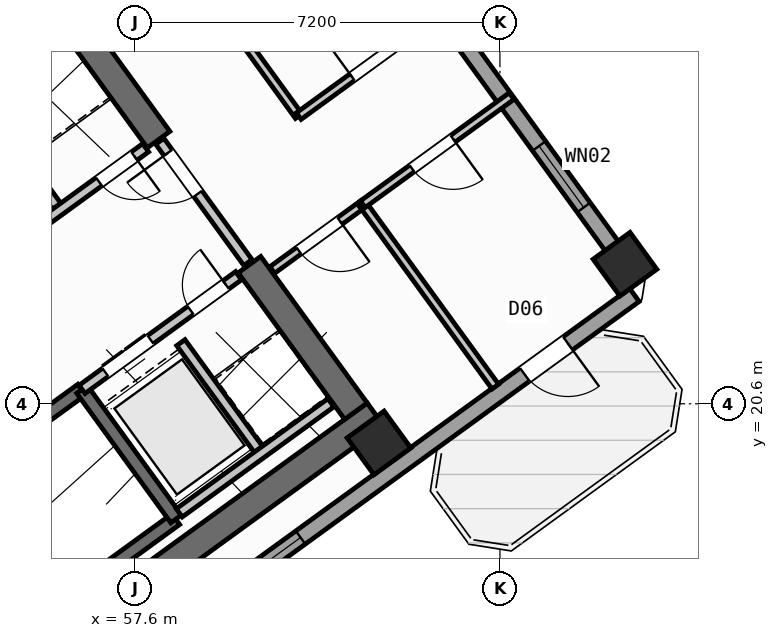
"""IFC4 building model, lengths in metres.
Left out: names, types, materials, properties, quantities, classifications, styles, units other than length and angle.
Written with IfcOpenShell. Run it as: python <this file> out.ifc"""

import sys

from ifc_helpers import new_model, si_unit, direction, frame, frame_2d, origin, origin_2d, place, context, subcontext, project, spatial, rectangle, hollow_rectangle, extrude, source, transform, mapped, element, fill, save


model = new_model("IFC4")
c1 = context("Model", 3, precision=1e-05, world=origin(), true_north=direction((0.0, 1.0)))
c2 = subcontext(c1, "Body", "Model", "MODEL_VIEW")
j1 = project(units=[si_unit("LENGTHUNIT", "METRE"), si_unit("PLANEANGLEUNIT", "RADIAN")], contexts=[c1])
p1 = place(None, origin())
s1 = spatial("IfcSite", under=j1, at=p1, CompositionType="ELEMENT")
p2 = place(p1, origin())
s2 = spatial("IfcBuilding", under=s1, at=p2, CompositionType="ELEMENT")
p3 = place(p2, frame((0.0, 0.0, 119.7)))
s3 = spatial("IfcBuildingStorey", under=s2, at=p3, CompositionType="ELEMENT", Elevation=119.7)
p4 = place(p3, frame((52.359, 13.14, 0.0), z_axis=(0.0, 0.0, 1.0), x_axis=(0.809014896919, 0.587788139183, 0.0)))
e1 = element("IfcWall", 1, at=p4, inside=s3, PredefinedType="SHEAR", context=c2, shape_type="SweptSolid", body=[
    extrude(rectangle(XDim=12.34, YDim=0.55, at=frame_2d((6.17, 0.0))), origin(), (0.0, 0.0, 1.0), 3.35),
])
p5 = place(p3, frame((61.958, 20.454, 0.0), z_axis=(0.0, 0.0, 1.0), x_axis=(-0.587802113096, 0.809004744015, 0.0)))
e2 = element("IfcWall", 2, at=p5, inside=s3, PredefinedType="SHEAR", context=c2, shape_type="SweptSolid", body=[
    extrude(rectangle(XDim=3.575, YDim=0.55, at=frame_2d((1.788, 0.0))), origin(), (0.0, 0.0, 1.0), 3.35),
])
p6 = place(p3, frame((58.064, 25.813, 0.0), z_axis=(0.0, 0.0, 1.0), x_axis=(-0.587764933797, 0.809031756236, 0.0)))
e3 = element("IfcWall", 3, at=p6, inside=s3, PredefinedType="SHEAR", context=c2, shape_type="SweptSolid", body=[
    extrude(rectangle(XDim=6.425, YDim=0.55, at=frame_2d((3.212, 0.0))), origin(), (0.0, 0.0, 1.0), 3.35),
])
m1 = source(origin(), c2, "Body", "SweptSolid", [
    extrude(hollow_rectangle(XDim=0.9, YDim=0.9, WallThickness=0.036, at=origin_2d()), origin(), (0.0, 0.0, 1.0), 3.6),
])
for number, where, z_axis, x_axis in (
    (4, (62.414, 19.827, 0.0), (0.0, 0.0, 1.0), (0.809, 0.588, 0.0)),
    (5, (67.268, 23.354, 0.0), (0.0, 0.0, 1.0), (0.809, 0.588, 0.0)),
):
    element("IfcColumn", number, at=place(p3, frame(where, z_axis=z_axis, x_axis=x_axis)), inside=s3, PredefinedType="COLUMN", context=c2, shape_type="MappedRepresentation", body=[
        mapped(m1, transform((0.0, 0.0, 0.0), scale=1.0)),
    ])
p7 = place(p3, frame((54.81, 40.5, 0.0), z_axis=(0.0, 0.0, 1.0), x_axis=(0.587783625747, -0.809018176127, 0.0)))
e6 = element("IfcWall", 6, at=p7, inside=s3, PredefinedType="STANDARD", context=c2, shape_type="SweptSolid", body=[
    extrude(rectangle(XDim=21.587, YDim=0.32, at=frame_2d((10.794, 0.0))), origin(), (0.0, 0.0, 1.0), 2.775),
])
p8 = place(p7, frame((2.143, 0.0, 0.8)))
e7 = element("IfcOpeningElement", 7, at=p8, cuts=e6, PredefinedType="OPENING", context=c2, shape_type="SweptSolid", body=[
    extrude(rectangle(XDim=2.1, YDim=1.55, at=frame_2d((1.05, 0.775))), frame((0.0, 0.17, 0.0), z_axis=(0.0, -1.0, 0.0), x_axis=(1.0, 0.0, 0.0)), (0.0, 0.0, 1.0), 0.34),
])
p9 = place(p7, frame((9.344, 0.0, 0.85)))
e8 = element("IfcOpeningElement", 8, at=p9, cuts=e6, PredefinedType="OPENING", context=c2, shape_type="SweptSolid", body=[
    extrude(rectangle(XDim=1.8, YDim=1.5, at=frame_2d((0.9, 0.75))), frame((0.0, 0.17, 0.0), z_axis=(0.0, -1.0, 0.0), x_axis=(1.0, 0.0, 0.0)), (0.0, 0.0, 1.0), 0.34),
])
p10 = place(p7, frame((18.309, 0.0, 0.85)))
e9 = element("IfcOpeningElement", 9, at=p10, cuts=e6, PredefinedType="OPENING", context=c2, shape_type="SweptSolid", body=[
    extrude(rectangle(XDim=1.5, YDim=1.5, at=frame_2d((0.75, 0.75))), frame((0.0, 0.17, 0.0), z_axis=(0.0, -1.0, 0.0), x_axis=(1.0, 0.0, 0.0)), (0.0, 0.0, 1.0), 0.34),
])
p11 = place(p3, frame((67.454, 22.747, 0.0), z_axis=(0.0, 0.0, 1.0), x_axis=(-0.809021120468, -0.587779573171, 0.0)))
e10 = element("IfcWall", 10, at=p11, inside=s3, PredefinedType="STANDARD", context=c2, shape_type="SweptSolid", body=[
    extrude(rectangle(XDim=17.588, YDim=0.32, at=frame_2d((8.794, 0.0))), origin(), (0.0, 0.0, 1.0), 3.35),
])
p12 = place(p11, frame((1.624, 0.0, 0.0)))
e11 = element("IfcOpeningElement", 11, at=p12, cuts=e10, PredefinedType="OPENING", context=c2, shape_type="SweptSolid", body=[
    extrude(rectangle(XDim=1.05, YDim=2.15, at=frame_2d((0.525, 1.075))), frame((0.0, 0.17, 0.0), z_axis=(0.0, -1.0, 0.0), x_axis=(1.0, 0.0, 0.0)), (0.0, 0.0, 1.0), 0.34),
])
p13 = place(p11, frame((8.144, 0.0, 0.8)))
e12 = element("IfcOpeningElement", 12, at=p13, cuts=e10, PredefinedType="OPENING", context=c2, shape_type="SweptSolid", body=[
    extrude(rectangle(XDim=2.1, YDim=1.55, at=frame_2d((1.05, 0.775))), frame((0.0, 0.17, 0.0), z_axis=(0.0, -1.0, 0.0), x_axis=(1.0, 0.0, 0.0)), (0.0, 0.0, 1.0), 0.34),
])
p14 = place(p11, frame((13.344, 0.0, 0.8)))
e13 = element("IfcOpeningElement", 13, at=p14, cuts=e10, PredefinedType="OPENING", context=c2, shape_type="SweptSolid", body=[
    extrude(rectangle(XDim=2.1, YDim=1.55, at=frame_2d((1.05, 0.775))), frame((0.0, 0.17, 0.0), z_axis=(0.0, -1.0, 0.0), x_axis=(1.0, 0.0, 0.0)), (0.0, 0.0, 1.0), 0.34),
])
p15 = place(p3, frame((49.863, 23.44, 0.0), z_axis=(0.0, 0.0, 1.0), x_axis=(0.809003474932, 0.587803859759, 0.0)))
e14 = element("IfcWall", 14, at=p15, inside=s3, PredefinedType="SHEAR", context=c2, shape_type="SweptSolid", body=[
    extrude(rectangle(XDim=7.46, YDim=0.26, at=frame_2d((3.73, 0.0))), origin(), (0.0, 0.0, 1.0), 3.35),
])
p16 = place(p15, frame((0.36, 0.0, 0.0)))
e15 = element("IfcOpeningElement", 15, at=p16, cuts=e14, PredefinedType="OPENING", context=c2, shape_type="SweptSolid", body=[
    extrude(rectangle(XDim=0.86, YDim=2.05, at=frame_2d((0.43, 1.025))), frame((0.0, 0.14, 0.0), z_axis=(0.0, -1.0, 0.0), x_axis=(1.0, 0.0, 0.0)), (0.0, 0.0, 1.0), 0.28),
])
p17 = place(p3, frame((52.472, 14.013, 0.0), z_axis=(0.0, 0.0, 1.0), x_axis=(0.809028366311, 0.587769599847, 0.0)))
e16 = element("IfcWall", 16, at=p17, inside=s3, PredefinedType="SHEAR", context=c2, shape_type="SweptSolid", body=[
    extrude(rectangle(XDim=7.33, YDim=0.26, at=frame_2d((3.665, 0.0))), origin(), (0.0, 0.0, 1.0), 3.35),
])
p18 = place(p3, frame((50.615, 16.57, 0.0), z_axis=(0.0, 0.0, 1.0), x_axis=(0.809028366311, 0.587769599847, 0.0)))
e17 = element("IfcWall", 17, at=p18, inside=s3, PredefinedType="SHEAR", context=c2, shape_type="SweptSolid", body=[
    extrude(rectangle(XDim=7.33, YDim=0.26, at=frame_2d((3.665, 0.0))), origin(), (0.0, 0.0, 1.0), 3.35),
])
p19 = place(p18, frame((0.22, 0.0, 0.0)))
e18 = element("IfcOpeningElement", 18, at=p19, cuts=e17, PredefinedType="OPENING", context=c2, shape_type="SweptSolid", body=[
    extrude(rectangle(XDim=1.1, YDim=2.1, at=frame_2d((0.55, 1.05))), frame((0.0, 0.14, 0.0), z_axis=(0.0, -1.0, 0.0), x_axis=(1.0, 0.0, 0.0)), (0.0, 0.0, 1.0), 0.28),
])
p20 = place(p3, frame((58.41, 18.327, 0.0), z_axis=(0.0, 0.0, 1.0), x_axis=(-0.58776738483, 0.809029975545, 0.0)))
e19 = element("IfcWall", 19, at=p20, inside=s3, PredefinedType="SHEAR", context=c2, shape_type="SweptSolid", body=[
    extrude(rectangle(XDim=3.16, YDim=0.26, at=frame_2d((1.58, 0.0))), origin(), (0.0, 0.0, 1.0), 3.35),
])
p21 = place(p3, frame((56.553, 20.884, 0.0), z_axis=(0.0, 0.0, 1.0), x_axis=(0.809023564264, 0.58777620951, 0.0)))
e20 = element("IfcWall", 20, at=p21, inside=s3, PredefinedType="STANDARD", context=c2, shape_type="SweptSolid", body=[
    extrude(rectangle(XDim=3.818, YDim=0.2, at=frame_2d((1.909, 0.0))), origin(), (0.0, 0.0, 1.0), 3.34),
])
p22 = place(p21, frame((0.57, 0.0, 0.0)))
e21 = element("IfcOpeningElement", 21, at=p22, cuts=e20, PredefinedType="OPENING", context=c2, shape_type="SweptSolid", body=[
    extrude(rectangle(XDim=1.1, YDim=2.15, at=frame_2d((0.55, 1.075))), frame((0.0, 0.11, 0.0), z_axis=(0.0, -1.0, 0.0), x_axis=(1.0, 0.0, 0.0)), (0.0, 0.0, 1.0), 0.22),
])
p23 = place(p21, frame((2.65, 0.0, 0.0)))
e22 = element("IfcOpeningElement", 22, at=p23, cuts=e20, PredefinedType="OPENING", context=c2, shape_type="SweptSolid", body=[
    extrude(rectangle(XDim=0.86, YDim=2.05, at=frame_2d((0.43, 1.025))), frame((0.0, 0.11, 0.0), z_axis=(0.0, -1.0, 0.0), x_axis=(1.0, 0.0, 0.0)), (0.0, 0.0, 1.0), 0.22),
])
p24 = place(p3, frame((60.067, 19.655, 0.0), z_axis=(0.0, 0.0, 1.0), x_axis=(-0.587800520745, 0.809005900975, 0.0)))
e23 = element("IfcWall", 23, at=p24, inside=s3, PredefinedType="STANDARD", context=c2, shape_type="SweptSolid", body=[
    extrude(rectangle(XDim=2.66, YDim=0.2, at=frame_2d((1.33, 0.0))), origin(), (0.0, 0.0, 1.0), 3.34),
])
p25 = place(p3, frame((58.472, 18.447, 0.0), z_axis=(0.0, 0.0, 1.0), x_axis=(0.809018631237, 0.587782999339, 0.0)))
e24 = element("IfcWall", 24, at=p25, inside=s3, PredefinedType="STANDARD", context=c2, shape_type="SweptSolid", body=[
    extrude(rectangle(XDim=3.698, YDim=0.2, at=frame_2d((1.849, 0.0))), origin(), (0.0, 0.0, 1.0), 3.34),
])
p26 = place(p3, frame((56.111, 24.419, 0.0), z_axis=(0.0, 0.0, 1.0), x_axis=(-0.58777848983, 0.809021907548, 0.0)))
e25 = element("IfcWall", 25, at=p26, inside=s3, PredefinedType="STANDARD", context=c2, shape_type="SweptSolid", body=[
    extrude(rectangle(XDim=2.88, YDim=0.2, at=frame_2d((1.44, 0.0))), origin(), (0.0, 0.0, 1.0), 3.34),
])
p27 = place(p3, frame((53.425, 22.468, 0.0), z_axis=(0.0, 0.0, 1.0), x_axis=(0.809024377198, 0.587775090574, 0.0)))
e26 = element("IfcWall", 26, at=p27, inside=s3, PredefinedType="STANDARD", context=c2, shape_type="SweptSolid", body=[
    extrude(rectangle(XDim=5.418, YDim=0.2, at=frame_2d((2.709, 0.0))), origin(), (0.0, 0.0, 1.0), 3.34),
])
p28 = place(p27, frame((4.28, 0.0, 0.0)))
e27 = element("IfcOpeningElement", 27, at=p28, cuts=e26, PredefinedType="OPENING", context=c2, shape_type="SweptSolid", body=[
    extrude(rectangle(XDim=0.86, YDim=2.05, at=frame_2d((0.43, 1.025))), frame((0.0, 0.11, 0.0), z_axis=(0.0, -1.0, 0.0), x_axis=(1.0, 0.0, 0.0)), (0.0, 0.0, 1.0), 0.22),
])
p29 = place(p27, frame((1.45, 0.0, 0.0)))
e28 = element("IfcOpeningElement", 28, at=p29, cuts=e26, PredefinedType="OPENING", context=c2, shape_type="SweptSolid", body=[
    extrude(rectangle(XDim=0.86, YDim=2.05, at=frame_2d((0.43, 1.025))), frame((0.0, 0.11, 0.0), z_axis=(0.0, -1.0, 0.0), x_axis=(1.0, 0.0, 0.0)), (0.0, 0.0, 1.0), 0.22),
])
p30 = place(p3, frame((59.827, 23.386, 0.0), z_axis=(0.0, 0.0, 1.0), x_axis=(-0.587803840107, 0.809003489211, 0.0)))
e29 = element("IfcWall", 29, at=p30, inside=s3, PredefinedType="STANDARD", context=c2, shape_type="SweptSolid", body=[
    extrude(rectangle(XDim=2.96, YDim=0.2, at=frame_2d((1.48, 0.0))), origin(), (0.0, 0.0, 1.0), 3.34),
])
p31 = place(p30, frame((1.68, 0.0, 0.0)))
e30 = element("IfcOpeningElement", 30, at=p31, cuts=e29, PredefinedType="OPENING", context=c2, shape_type="SweptSolid", body=[
    extrude(rectangle(XDim=1.0, YDim=2.1, at=frame_2d((0.5, 1.05))), frame((0.0, 0.11, 0.0), z_axis=(0.0, -1.0, 0.0), x_axis=(1.0, 0.0, 0.0)), (0.0, 0.0, 1.0), 0.22),
])
p32 = place(p3, frame((60.307, 23.24, 0.0), z_axis=(0.0, 0.0, 1.0), x_axis=(0.80898466188, 0.58782975158, 0.0)))
e31 = element("IfcWall", 31, at=p32, inside=s3, PredefinedType="PARTITIONING", context=c2, shape_type="SweptSolid", body=[
    extrude(rectangle(XDim=2.208, YDim=0.16, at=frame_2d((1.104, 0.0))), origin(), (0.0, 0.0, 1.0), 3.34),
])
p33 = place(p32, frame((0.648, 0.0, 0.0)))
e32 = element("IfcOpeningElement", 32, at=p33, cuts=e31, PredefinedType="OPENING", context=c2, shape_type="SweptSolid", body=[
    extrude(rectangle(XDim=1.0, YDim=2.1, at=frame_2d((0.5, 1.05))), frame((0.0, 0.09, 0.0), z_axis=(0.0, -1.0, 0.0), x_axis=(1.0, 0.0, 0.0)), (0.0, 0.0, 1.0), 0.18),
])
p34 = place(p3, frame((64.709, 20.938, 0.0), z_axis=(0.0, 0.0, 1.0), x_axis=(-0.587773666605, 0.809025411743, 0.0)))
e33 = element("IfcWall", 33, at=p34, inside=s3, PredefinedType="PARTITIONING", context=c2, shape_type="SweptSolid", body=[
    extrude(rectangle(XDim=4.45, YDim=0.16, at=frame_2d((2.225, 0.0))), origin(), (0.0, 0.0, 1.0), 3.34),
])
p35 = place(p3, frame((60.829, 26.278, 0.0), z_axis=(0.0, 0.0, 1.0), x_axis=(-0.587777474174, 0.809022645451, 0.0)))
e34 = element("IfcWall", 34, at=p35, inside=s3, PredefinedType="PARTITIONING", context=c2, shape_type="SweptSolid", body=[
    extrude(rectangle(XDim=15.1, YDim=0.16, at=frame_2d((7.55, 0.0))), origin(), (0.0, 0.0, 1.0), 3.34),
])
p36 = place(p3, frame((62.093, 24.538, 0.0), z_axis=(0.0, 0.0, 1.0), x_axis=(0.809035546126, 0.58775971715, 0.0)))
e35 = element("IfcWall", 35, at=p36, inside=s3, PredefinedType="PARTITIONING", context=c2, shape_type="SweptSolid", body=[
    extrude(rectangle(XDim=3.63, YDim=0.16, at=frame_2d((1.815, 0.0))), origin(), (0.0, 0.0, 1.0), 3.34),
])
p37 = place(p36, frame((1.2, 0.0, 0.0)))
e36 = element("IfcOpeningElement", 36, at=p37, cuts=e35, PredefinedType="OPENING", context=c2, shape_type="SweptSolid", body=[
    extrude(rectangle(XDim=1.0, YDim=2.1, at=frame_2d((0.5, 1.05))), frame((0.0, 0.09, 0.0), z_axis=(0.0, -1.0, 0.0), x_axis=(1.0, 0.0, 0.0)), (0.0, 0.0, 1.0), 0.18),
])
p38 = place(p3, frame((60.829, 26.278, 0.0), z_axis=(0.0, 0.0, 1.0), x_axis=(0.809003564202, 0.587803736896, 0.0)))
e37 = element("IfcWall", 37, at=p38, inside=s3, PredefinedType="PARTITIONING", context=c2, shape_type="SweptSolid", body=[
    extrude(rectangle(XDim=3.63, YDim=0.16, at=frame_2d((1.815, 0.0))), origin(), (0.0, 0.0, 1.0), 3.34),
])
p39 = place(p38, frame((1.305, 0.0, 0.0)))
e38 = element("IfcOpeningElement", 38, at=p39, cuts=e37, PredefinedType="OPENING", context=c2, shape_type="SweptSolid", body=[
    extrude(rectangle(XDim=1.0, YDim=2.1, at=frame_2d((0.5, 1.05))), frame((0.0, 0.09, 0.0), z_axis=(0.0, -1.0, 0.0), x_axis=(1.0, 0.0, 0.0)), (0.0, 0.0, 1.0), 0.18),
])
m2 = source(origin(), c2, "Body", "SweptSolid", [
    extrude(rectangle(XDim=1.05, YDim=2.15, at=frame_2d((0.525, 1.075))), frame((0.0, 0.025, 0.0), z_axis=(0.0, -1.0, 0.0), x_axis=(1.0, 0.0, 0.0)), (0.0, 0.0, 1.0), 0.05),
])
p40 = place(p12, origin())
e39 = element("IfcDoor", 39, at=p40, inside=s3, OperationType="SINGLE_SWING_LEFT", PredefinedType="DOOR", context=c2, shape_type="MappedRepresentation", body=[
    mapped(m2, transform((0.0, 0.0, 0.0), scale=1.0)),
])
fill(e11, e39)
m3 = source(origin(), c2, "Body", "SweptSolid", [
    extrude(rectangle(XDim=1.5, YDim=1.5, at=frame_2d((0.75, 0.75))), frame((0.0, 0.03, 0.0), z_axis=(0.0, -1.0, 0.0), x_axis=(1.0, 0.0, 0.0)), (0.0, 0.0, 1.0), 0.06),
])
p41 = place(p10, origin())
e40 = element("IfcWindow", 40, at=p41, inside=s3, PartitioningType="SINGLE_PANEL", PredefinedType="WINDOW", context=c2, shape_type="MappedRepresentation", body=[
    mapped(m3, transform((0.0, 0.0, 0.0), scale=1.0)),
])
fill(e9, e40)
m4 = source(origin(), c2, "Body", "SweptSolid", [
    extrude(rectangle(XDim=2.1, YDim=1.55, at=frame_2d((1.05, 0.775))), frame((0.0, 0.03, 0.0), z_axis=(0.0, -1.0, 0.0), x_axis=(1.0, 0.0, 0.0)), (0.0, 0.0, 1.0), 0.06),
])
p42 = place(p13, origin())
e41 = element("IfcWindow", 41, at=p42, inside=s3, PartitioningType="SINGLE_PANEL", PredefinedType="WINDOW", context=c2, shape_type="MappedRepresentation", body=[
    mapped(m4, transform((0.0, 0.0, 0.0), scale=1.0)),
])
fill(e12, e41)
m5 = source(origin(), c2, "Body", "SweptSolid", [
    extrude(rectangle(XDim=1.1, YDim=2.15, at=frame_2d((0.55, 1.075))), frame((0.0, 0.025, 0.0), z_axis=(0.0, -1.0, 0.0), x_axis=(1.0, 0.0, 0.0)), (0.0, 0.0, 1.0), 0.05),
])
p43 = place(p22, origin())
e42 = element("IfcDoor", 42, at=p43, inside=s3, OperationType="DOUBLE_DOOR_SLIDING", PredefinedType="DOOR", context=c2, shape_type="MappedRepresentation", body=[
    mapped(m5, transform((0.0, 0.0, 0.0), scale=1.0)),
])
fill(e21, e42)
m6 = source(origin(), c2, "Body", "SweptSolid", [
    extrude(rectangle(XDim=0.86, YDim=2.05, at=frame_2d((0.43, 1.025))), frame((0.0, 0.025, 0.0), z_axis=(0.0, -1.0, 0.0), x_axis=(1.0, 0.0, 0.0)), (0.0, 0.0, 1.0), 0.05),
])
p44 = place(p23, origin())
e43 = element("IfcDoor", 43, at=p44, inside=s3, OperationType="SINGLE_SWING_RIGHT", PredefinedType="DOOR", context=c2, shape_type="MappedRepresentation", body=[
    mapped(m6, transform((0.0, 0.0, 0.0), scale=1.0)),
])
fill(e22, e43)
p45 = place(p28, frame((0.86, 0.0, 0.0), z_axis=(0.0, 0.0, 1.0), x_axis=(-1.0, 0.0, 0.0)))
e44 = element("IfcDoor", 44, at=p45, inside=s3, OperationType="SINGLE_SWING_LEFT", PredefinedType="DOOR", context=c2, shape_type="MappedRepresentation", body=[
    mapped(m6, transform((0.0, 0.0, 0.0), scale=1.0)),
])
fill(e27, e44)
m7 = source(origin(), c2, "Body", "SweptSolid", [
    extrude(rectangle(XDim=1.0, YDim=2.1, at=frame_2d((0.5, 1.05))), frame((0.0, 0.025, 0.0), z_axis=(0.0, -1.0, 0.0), x_axis=(1.0, 0.0, 0.0)), (0.0, 0.0, 1.0), 0.05),
])
p46 = place(p33, frame((1.0, 0.0, 0.0), z_axis=(0.0, 0.0, 1.0), x_axis=(-1.0, 0.0, 0.0)))
e45 = element("IfcDoor", 45, at=p46, inside=s3, OperationType="SINGLE_SWING_LEFT", PredefinedType="DOOR", context=c2, shape_type="MappedRepresentation", body=[
    mapped(m7, transform((0.0, 0.0, 0.0), scale=1.0)),
])
fill(e32, e45)
p47 = place(p31, origin())
e46 = element("IfcDoor", 46, at=p47, inside=s3, OperationType="SINGLE_SWING_RIGHT", PredefinedType="DOOR", context=c2, shape_type="MappedRepresentation", body=[
    mapped(m7, transform((0.0, 0.0, 0.0), scale=1.0)),
])
fill(e30, e46)
p48 = place(p39, origin())
e47 = element("IfcDoor", 47, at=p48, inside=s3, OperationType="SINGLE_SWING_LEFT", PredefinedType="DOOR", context=c2, shape_type="MappedRepresentation", body=[
    mapped(m7, transform((0.0, 0.0, 0.0), scale=1.0)),
])
fill(e38, e47)
p49 = place(p37, frame((1.0, 0.0, 0.0), z_axis=(0.0, 0.0, 1.0), x_axis=(-1.0, 0.0, 0.0)))
e48 = element("IfcDoor", 48, at=p49, inside=s3, OperationType="SINGLE_SWING_LEFT", PredefinedType="DOOR", context=c2, shape_type="MappedRepresentation", body=[
    mapped(m7, transform((0.0, 0.0, 0.0), scale=1.0)),
])
fill(e36, e48)
save(model, sys.argv[1])
